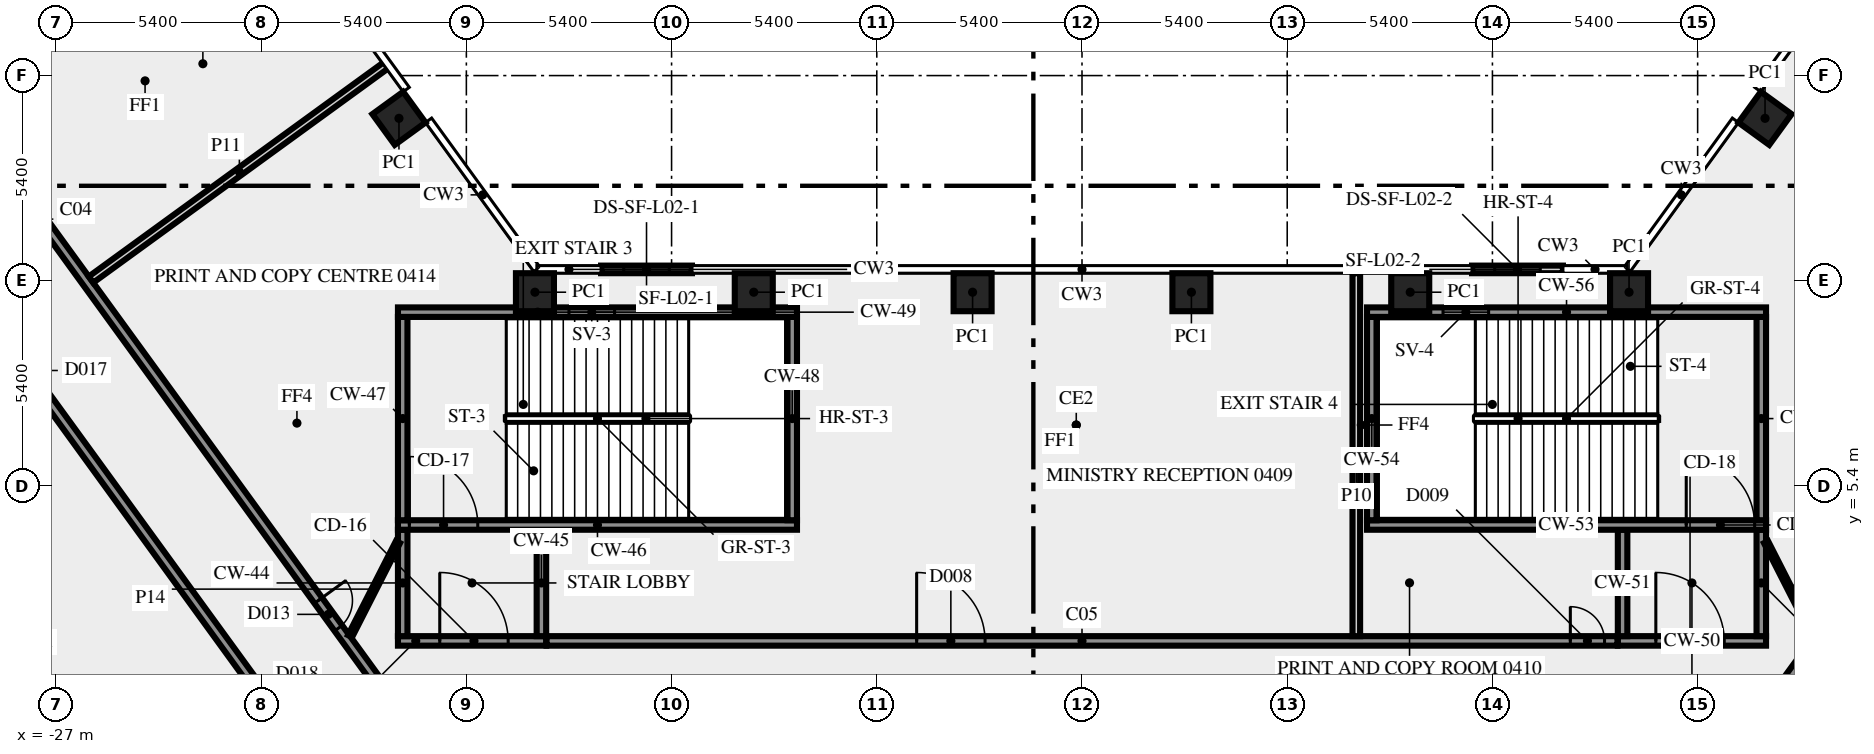
"""IFC4 building model, lengths in metres.
Left out: names, types, materials, properties, quantities, classifications, styles, units other than length and angle.
Written with IfcOpenShell. Run it as: python <this file> out.ifc"""

import sys

from ifc_helpers import new_model, si_unit, direction, frame, frame_2d, origin, origin_2d, place, context, subcontext, project, spatial, rectangle, extrude, element, fill, save


model = new_model("IFC4")
c1 = context("Model", 3, precision=1e-05, world=origin(), true_north=direction((0.0, 1.0)))
c2 = subcontext(c1, "Body", "Model", "MODEL_VIEW")
j1 = project(units=[si_unit("LENGTHUNIT", "METRE"), si_unit("PLANEANGLEUNIT", "RADIAN")], contexts=[c1])
p1 = place(None, origin())
s1 = spatial("IfcSite", under=j1, at=p1, CompositionType="ELEMENT")
p2 = place(p1, origin())
s2 = spatial("IfcBuilding", under=s1, at=p2, CompositionType="ELEMENT")
p3 = place(p2, frame((0.0, 0.0, 20.5)))
s3 = spatial("IfcBuildingStorey", under=s2, at=p3, CompositionType="ELEMENT", Elevation=20.5)
for number, where, z_axis, x_axis in (
    (1, (-17.974, 15.075, 0.0), (0.0, 0.0, 1.0), (-0.588, 0.809, 0.0)),
    (2, (17.974, 15.075, 0.0), (0.0, 0.0, 1.0), (-0.588, -0.809, 0.0)),
    (3, (14.395, 10.5, 0.0), (0.0, 0.0, 1.0), (-1.0, 0.0, 0.0)),
    (4, (8.637, 10.5, 0.0), (0.0, 0.0, 1.0), (-1.0, 0.0, 0.0)),
    (5, (2.879, 10.5, 0.0), (0.0, 0.0, 1.0), (-1.0, 0.0, 0.0)),
    (6, (-2.879, 10.5, 0.0), (0.0, 0.0, 1.0), (-1.0, 0.0, 0.0)),
    (7, (-8.637, 10.5, 0.0), (0.0, 0.0, 1.0), (-1.0, 0.0, 0.0)),
    (8, (-14.395, 10.5, 0.0), (0.0, 0.0, 1.0), (-1.0, 0.0, 0.0)),
):
    element("IfcColumn", number, at=place(p3, frame(where, z_axis=z_axis, x_axis=x_axis)), inside=s3, PredefinedType="COLUMN", context=c2, shape_type="SweptSolid", body=[
        extrude(rectangle(XDim=1.0, YDim=1.0, at=origin_2d()), origin(), (0.0, 0.0, 1.0), 3.9),
    ])
p4 = place(p3, frame((12.655, 11.1, 0.0), z_axis=(0.0, 0.0, 1.0), x_axis=(-1.0, 0.0, 0.0)))
e9 = element("IfcWall", 9, at=p4, inside=s3, PredefinedType="SOLIDWALL", context=c2, shape_type="SweptSolid", body=[
    extrude(rectangle(XDim=2.392, YDim=0.2, at=frame_2d((1.196, 0.0))), origin(), (0.0, 0.0, 1.0), 3.9),
])
p5 = place(p4, frame((0.596, 0.0, 1.0)))
e10 = element("IfcOpeningElement", 10, at=p5, cuts=e9, PredefinedType="OPENING", context=c2, shape_type="SweptSolid", body=[
    extrude(rectangle(XDim=1.2, YDim=1.2, at=frame_2d((0.6, 0.6))), frame((0.0, 0.11, 0.0), z_axis=(0.0, -1.0, 0.0), x_axis=(1.0, 0.0, 0.0)), (0.0, 0.0, 1.0), 0.22),
])
p6 = place(p3, frame((-10.263, 11.1, 0.0), z_axis=(0.0, 0.0, 1.0), x_axis=(-1.0, 0.0, 0.0)))
e11 = element("IfcWall", 11, at=p6, inside=s3, PredefinedType="SOLIDWALL", context=c2, shape_type="SweptSolid", body=[
    extrude(rectangle(XDim=2.392, YDim=0.2, at=frame_2d((1.196, 0.0))), origin(), (0.0, 0.0, 1.0), 3.9),
])
p7 = place(p6, frame((0.596, 0.0, 1.0)))
e12 = element("IfcOpeningElement", 12, at=p7, cuts=e11, PredefinedType="OPENING", context=c2, shape_type="SweptSolid", body=[
    extrude(rectangle(XDim=1.2, YDim=1.2, at=frame_2d((0.6, 0.6))), frame((0.0, 0.11, 0.0), z_axis=(0.0, -1.0, 0.0), x_axis=(1.0, 0.0, 0.0)), (0.0, 0.0, 1.0), 0.22),
])
p8 = place(p3, frame((-18.0, 1.325, 0.0), z_axis=(0.0, 0.0, 1.0), x_axis=(1.0, 0.0, 0.0)))
e13 = element("IfcWall", 13, at=p8, inside=s3, PredefinedType="SHEAR", context=c2, shape_type="SweptSolid", body=[
    extrude(rectangle(XDim=3.9, YDim=0.25, at=frame_2d((1.95, 0.0))), origin(), (0.0, 0.0, 1.0), 3.9),
])
p9 = place(p8, frame((1.1, 0.0, 0.0)))
e14 = element("IfcOpeningElement", 14, at=p9, cuts=e13, PredefinedType="OPENING", context=c2, shape_type="SweptSolid", body=[
    extrude(rectangle(XDim=1.8, YDim=2.1, at=frame_2d((0.9, 1.05))), frame((0.0, 0.135, 0.0), z_axis=(0.0, -1.0, 0.0), x_axis=(1.0, 0.0, 0.0)), (0.0, 0.0, 1.0), 0.27),
])
for number, where, z_axis, x_axis in (
    (15, (-17.875, 1.45, 0.0), (0.0, 0.0, 1.0), (0.0, 1.0, 0.0)),
    (16, (-14.225, 1.45, 0.0), (0.0, 0.0, 1.0), (0.0, 1.0, 0.0)),
):
    element("IfcWall", number, at=place(p3, frame(where, z_axis=z_axis, x_axis=x_axis)), inside=s3, PredefinedType="SHEAR", context=c2, shape_type="SweptSolid", body=[
        extrude(rectangle(XDim=2.8, YDim=0.25, at=frame_2d((1.4, 0.0))), origin(), (0.0, 0.0, 1.0), 3.9),
    ])
p10 = place(p3, frame((-18.0, 4.375, 0.0), z_axis=(0.0, 0.0, 1.0), x_axis=(1.0, 0.0, 0.0)))
e17 = element("IfcWall", 17, at=p10, inside=s3, PredefinedType="SHEAR", context=c2, shape_type="SweptSolid", body=[
    extrude(rectangle(XDim=10.5, YDim=0.25, at=frame_2d((5.25, 0.0))), origin(), (0.0, 0.0, 1.0), 3.9),
])
p11 = place(p10, frame((0.3, 0.0, 0.0)))
e18 = element("IfcOpeningElement", 18, at=p11, cuts=e17, PredefinedType="OPENING", context=c2, shape_type="SweptSolid", body=[
    extrude(rectangle(XDim=1.8, YDim=2.1, at=frame_2d((0.9, 1.05))), frame((0.0, 0.135, 0.0), z_axis=(0.0, -1.0, 0.0), x_axis=(1.0, 0.0, 0.0)), (0.0, 0.0, 1.0), 0.27),
])
for number, where, z_axis, x_axis in (
    (19, (-17.875, 4.5, 0.0), (0.0, 0.0, 1.0), (0.0, 1.0, 0.0)),
    (20, (-7.625, 4.5, 0.0), (0.0, 0.0, 1.0), (0.0, 1.0, 0.0)),
):
    element("IfcWall", number, at=place(p3, frame(where, z_axis=z_axis, x_axis=x_axis)), inside=s3, PredefinedType="SHEAR", context=c2, shape_type="SweptSolid", body=[
        extrude(rectangle(XDim=5.35, YDim=0.25, at=frame_2d((2.675, 0.0))), origin(), (0.0, 0.0, 1.0), 3.9),
    ])
p12 = place(p3, frame((-18.0, 9.975, 0.0), z_axis=(0.0, 0.0, 1.0), x_axis=(1.0, 0.0, 0.0)))
e21 = element("IfcWall", 21, at=p12, inside=s3, PredefinedType="SHEAR", context=c2, shape_type="SweptSolid", body=[
    extrude(rectangle(XDim=10.5, YDim=0.25, at=frame_2d((5.25, 0.0))), origin(), (0.0, 0.0, 1.0), 3.9),
])
p13 = place(p12, frame((4.5, 0.0, 1.0)))
e22 = element("IfcOpeningElement", 22, at=p13, cuts=e21, PredefinedType="OPENING", context=c2, shape_type="SweptSolid", body=[
    extrude(rectangle(XDim=1.2, YDim=1.2, at=frame_2d((0.6, 0.6))), frame((0.0, 0.135, 0.0), z_axis=(0.0, -1.0, 0.0), x_axis=(1.0, 0.0, 0.0)), (0.0, 0.0, 1.0), 0.27),
])
p14 = place(p3, frame((14.1, 1.325, 0.0), z_axis=(0.0, 0.0, 1.0), x_axis=(1.0, 0.0, 0.0)))
e23 = element("IfcWall", 23, at=p14, inside=s3, PredefinedType="SHEAR", context=c2, shape_type="SweptSolid", body=[
    extrude(rectangle(XDim=3.9, YDim=0.25, at=frame_2d((1.95, 0.0))), origin(), (0.0, 0.0, 1.0), 3.9),
])
p15 = place(p14, frame((1.0, 0.0, 0.0)))
e24 = element("IfcOpeningElement", 24, at=p15, cuts=e23, PredefinedType="OPENING", context=c2, shape_type="SweptSolid", body=[
    extrude(rectangle(XDim=1.8, YDim=2.1, at=frame_2d((0.9, 1.05))), frame((0.0, 0.135, 0.0), z_axis=(0.0, -1.0, 0.0), x_axis=(1.0, 0.0, 0.0)), (0.0, 0.0, 1.0), 0.27),
])
for number, where, z_axis, x_axis in (
    (25, (14.225, 1.45, 0.0), (0.0, 0.0, 1.0), (0.0, 1.0, 0.0)),
    (26, (17.875, 1.45, 0.0), (0.0, 0.0, 1.0), (0.0, 1.0, 0.0)),
):
    element("IfcWall", number, at=place(p3, frame(where, z_axis=z_axis, x_axis=x_axis)), inside=s3, PredefinedType="SHEAR", context=c2, shape_type="SweptSolid", body=[
        extrude(rectangle(XDim=2.8, YDim=0.25, at=frame_2d((1.4, 0.0))), origin(), (0.0, 0.0, 1.0), 3.9),
    ])
p16 = place(p3, frame((7.5, 4.375, 0.0), z_axis=(0.0, 0.0, 1.0), x_axis=(1.0, 0.0, 0.0)))
e27 = element("IfcWall", 27, at=p16, inside=s3, PredefinedType="SHEAR", context=c2, shape_type="SweptSolid", body=[
    extrude(rectangle(XDim=10.5, YDim=0.25, at=frame_2d((5.25, 0.0))), origin(), (0.0, 0.0, 1.0), 3.9),
])
p17 = place(p16, frame((8.4, 0.0, 0.0)))
e28 = element("IfcOpeningElement", 28, at=p17, cuts=e27, PredefinedType="OPENING", context=c2, shape_type="SweptSolid", body=[
    extrude(rectangle(XDim=1.8, YDim=2.1, at=frame_2d((0.9, 1.05))), frame((0.0, 0.135, 0.0), z_axis=(0.0, -1.0, 0.0), x_axis=(1.0, 0.0, 0.0)), (0.0, 0.0, 1.0), 0.27),
])
for number, where, z_axis, x_axis in (
    (29, (7.625, 4.5, 0.0), (0.0, 0.0, 1.0), (0.0, 1.0, 0.0)),
    (30, (17.875, 4.5, 0.0), (0.0, 0.0, 1.0), (0.0, 1.0, 0.0)),
):
    element("IfcWall", number, at=place(p3, frame(where, z_axis=z_axis, x_axis=x_axis)), inside=s3, PredefinedType="SHEAR", context=c2, shape_type="SweptSolid", body=[
        extrude(rectangle(XDim=5.35, YDim=0.25, at=frame_2d((2.675, 0.0))), origin(), (0.0, 0.0, 1.0), 3.9),
    ])
p18 = place(p3, frame((7.5, 9.975, 0.0), z_axis=(0.0, 0.0, 1.0), x_axis=(1.0, 0.0, 0.0)))
e31 = element("IfcWall", 31, at=p18, inside=s3, PredefinedType="SHEAR", context=c2, shape_type="SweptSolid", body=[
    extrude(rectangle(XDim=10.5, YDim=0.25, at=frame_2d((5.25, 0.0))), origin(), (0.0, 0.0, 1.0), 3.9),
])
p19 = place(p18, frame((2.0, 0.0, 1.0)))
e32 = element("IfcOpeningElement", 32, at=p19, cuts=e31, PredefinedType="OPENING", context=c2, shape_type="SweptSolid", body=[
    extrude(rectangle(XDim=1.2, YDim=1.2, at=frame_2d((0.6, 0.6))), frame((0.0, 0.135, 0.0), z_axis=(0.0, -1.0, 0.0), x_axis=(1.0, 0.0, 0.0)), (0.0, 0.0, 1.0), 0.27),
])
p20 = place(p3, frame((-20.531, -1.523, 0.0), z_axis=(0.0, 0.0, 1.0), x_axis=(-0.587784522481, 0.809017524614, 0.0)))
e33 = element("IfcWall", 33, at=p20, inside=s3, PredefinedType="SOLIDWALL", context=c2, shape_type="SweptSolid", body=[
    extrude(rectangle(XDim=49.912, YDim=0.25, at=frame_2d((24.956, 0.0))), origin(), (0.0, 0.0, 1.0), 3.9),
])
p21 = place(p20, frame((30.765, 0.0, 0.0)))
e34 = element("IfcOpeningElement", 34, at=p21, cuts=e33, PredefinedType="OPENING", context=c2, shape_type="SweptSolid", body=[
    extrude(rectangle(XDim=0.9, YDim=2.1, at=frame_2d((0.45, 1.05))), frame((0.0, 0.135, 0.0), z_axis=(0.0, -1.0, 0.0), x_axis=(1.0, 0.0, 0.0)), (0.0, 0.0, 1.0), 0.27),
])
p22 = place(p20, frame((0.533, 0.0, 0.0)))
e35 = element("IfcOpeningElement", 35, at=p22, cuts=e33, PredefinedType="OPENING", context=c2, shape_type="SweptSolid", body=[
    extrude(rectangle(XDim=0.9, YDim=2.1, at=frame_2d((0.45, 1.05))), frame((0.0, 0.135, 0.0), z_axis=(0.0, -1.0, 0.0), x_axis=(1.0, 0.0, 0.0)), (0.0, 0.0, 1.0), 0.27),
])
p23 = place(p20, frame((22.416, 0.0, 0.0)))
e36 = element("IfcOpeningElement", 36, at=p23, cuts=e33, PredefinedType="OPENING", context=c2, shape_type="SweptSolid", body=[
    extrude(rectangle(XDim=0.9, YDim=2.1, at=frame_2d((0.45, 1.05))), frame((0.0, 0.135, 0.0), z_axis=(0.0, -1.0, 0.0), x_axis=(1.0, 0.0, 0.0)), (0.0, 0.0, 1.0), 0.27),
])
p24 = place(p20, frame((11.866, 0.0, 0.0)))
e37 = element("IfcOpeningElement", 37, at=p24, cuts=e33, PredefinedType="OPENING", context=c2, shape_type="SweptSolid", body=[
    extrude(rectangle(XDim=0.9, YDim=2.1, at=frame_2d((0.45, 1.05))), frame((0.0, 0.135, 0.0), z_axis=(0.0, -1.0, 0.0), x_axis=(1.0, 0.0, 0.0)), (0.0, 0.0, 1.0), 0.27),
])
p25 = place(p20, frame((29.166, 0.0, 0.0)))
e38 = element("IfcOpeningElement", 38, at=p25, cuts=e33, PredefinedType="OPENING", context=c2, shape_type="SweptSolid", body=[
    extrude(rectangle(XDim=0.9, YDim=2.1, at=frame_2d((0.45, 1.05))), frame((0.0, 0.135, 0.0), z_axis=(0.0, -1.0, 0.0), x_axis=(1.0, 0.0, 0.0)), (0.0, 0.0, 1.0), 0.27),
])
p26 = place(p3, frame((-37.232, 25.972, 0.0), z_axis=(0.0, 0.0, 1.0), x_axis=(0.587786323093, -0.809016216391, 0.0)))
e39 = element("IfcWall", 39, at=p26, inside=s3, PredefinedType="SOLIDWALL", context=c2, shape_type="SweptSolid", body=[
    extrude(rectangle(XDim=33.493, YDim=0.25, at=frame_2d((16.747, 0.0))), origin(), (0.0, 0.0, 1.0), 3.9),
])
p27 = place(p26, frame((10.685, 0.0, 0.0)))
e40 = element("IfcOpeningElement", 40, at=p27, cuts=e39, PredefinedType="OPENING", context=c2, shape_type="SweptSolid", body=[
    extrude(rectangle(XDim=1.0, YDim=2.1, at=frame_2d((0.5, 1.05))), frame((0.0, 0.135, 0.0), z_axis=(0.0, -1.0, 0.0), x_axis=(1.0, 0.0, 0.0)), (0.0, 0.0, 1.0), 0.27),
])
p28 = place(p26, frame((29.152, 0.0, 0.0)))
e41 = element("IfcOpeningElement", 41, at=p28, cuts=e39, PredefinedType="OPENING", context=c2, shape_type="SweptSolid", body=[
    extrude(rectangle(XDim=0.9, YDim=2.1, at=frame_2d((0.45, 1.05))), frame((0.0, 0.135, 0.0), z_axis=(0.0, -1.0, 0.0), x_axis=(1.0, 0.0, 0.0)), (0.0, 0.0, 1.0), 0.27),
])
p29 = place(p26, frame((12.385, 0.0, 0.0)))
e42 = element("IfcOpeningElement", 42, at=p29, cuts=e39, PredefinedType="OPENING", context=c2, shape_type="SweptSolid", body=[
    extrude(rectangle(XDim=0.9, YDim=2.1, at=frame_2d((0.45, 1.05))), frame((0.0, 0.135, 0.0), z_axis=(0.0, -1.0, 0.0), x_axis=(1.0, 0.0, 0.0)), (0.0, 0.0, 1.0), 0.27),
])
p30 = place(p3, frame((-14.09, 1.325, 0.0), z_axis=(0.0, 0.0, 1.0), x_axis=(1.0, 0.0, 0.0)))
e43 = element("IfcWall", 43, at=p30, inside=s3, PredefinedType="SOLIDWALL", context=c2, shape_type="SweptSolid", body=[
    extrude(rectangle(XDim=28.18, YDim=0.25, at=frame_2d((14.09, 0.0))), origin(), (0.0, 0.0, 1.0), 3.9),
])
p31 = place(p30, frame((26.94, 0.0, 0.0)))
e44 = element("IfcOpeningElement", 44, at=p31, cuts=e43, PredefinedType="OPENING", context=c2, shape_type="SweptSolid", body=[
    extrude(rectangle(XDim=0.9, YDim=2.1, at=frame_2d((0.45, 1.05))), frame((0.0, 0.135, 0.0), z_axis=(0.0, -1.0, 0.0), x_axis=(1.0, 0.0, 0.0)), (0.0, 0.0, 1.0), 0.27),
])
p32 = place(p30, frame((9.739, 0.0, 0.0)))
e45 = element("IfcOpeningElement", 45, at=p32, cuts=e43, PredefinedType="OPENING", context=c2, shape_type="SweptSolid", body=[
    extrude(rectangle(XDim=1.8, YDim=2.1, at=frame_2d((0.9, 1.05))), frame((0.0, 0.135, 0.0), z_axis=(0.0, -1.0, 0.0), x_axis=(1.0, 0.0, 0.0)), (0.0, 0.0, 1.0), 0.27),
])
p33 = place(p3, frame((17.545, -1.125, 0.0), z_axis=(0.0, 0.0, 1.0), x_axis=(0.587786323093, 0.809016216391, 0.0)))
e46 = element("IfcWall", 46, at=p33, inside=s3, PredefinedType="SOLIDWALL", context=c2, shape_type="SweptSolid", body=[
    extrude(rectangle(XDim=33.493, YDim=0.25, at=frame_2d((16.747, 0.0))), origin(), (0.0, 0.0, 1.0), 3.9),
])
p34 = place(p33, frame((24.508, 0.0, 0.0)))
e47 = element("IfcOpeningElement", 47, at=p34, cuts=e46, PredefinedType="OPENING", context=c2, shape_type="SweptSolid", body=[
    extrude(rectangle(XDim=0.9, YDim=2.1, at=frame_2d((0.45, 1.05))), frame((0.0, 0.135, 0.0), z_axis=(0.0, -1.0, 0.0), x_axis=(1.0, 0.0, 0.0)), (0.0, 0.0, 1.0), 0.27),
])
p35 = place(p33, frame((12.724, 0.0, 0.0)))
e48 = element("IfcOpeningElement", 48, at=p35, cuts=e46, PredefinedType="OPENING", context=c2, shape_type="SweptSolid", body=[
    extrude(rectangle(XDim=1.8, YDim=2.1, at=frame_2d((0.9, 1.05))), frame((0.0, 0.135, 0.0), z_axis=(0.0, -1.0, 0.0), x_axis=(1.0, 0.0, 0.0)), (0.0, 0.0, 1.0), 0.27),
])
p36 = place(p3, frame((-30.056, 16.308, 0.0), z_axis=(0.0, 0.0, 1.0), x_axis=(0.807610282865, 0.589716568371, 0.0)))
e49 = element("IfcWall", 49, at=p36, inside=s3, PredefinedType="PARTITIONING", context=c2, shape_type="SweptSolid", body=[
    extrude(rectangle(XDim=9.55, YDim=0.12, at=frame_2d((4.775, 0.0))), origin(), (0.0, 0.0, 1.0), 2.9),
])
p37 = place(p3, frame((7.218, 11.0, 0.0), z_axis=(0.0, 0.0, 1.0), x_axis=(0.0, -1.0, 0.0)))
e50 = element("IfcWall", 50, at=p37, inside=s3, PredefinedType="SOLIDWALL", context=c2, shape_type="SweptSolid", body=[
    extrude(rectangle(XDim=9.55, YDim=0.2, at=frame_2d((4.775, 0.0))), origin(), (0.0, 0.0, 1.0), 2.9),
])
p38 = place(p3, frame((-18.269, 16.504, 0.0), z_axis=(0.0, 0.0, 1.0), x_axis=(-0.809047748514, -0.587742920522, 0.0)))
e51 = element("IfcWall", 51, at=p38, inside=s3, PredefinedType="SOLIDWALL", context=c2, shape_type="SweptSolid", body=[
    extrude(rectangle(XDim=9.651, YDim=0.2, at=frame_2d((4.825, 0.0))), origin(), (0.0, 0.0, 1.0), 2.9),
])
for number, where, z_axis, x_axis in (
    (52, (-19.261, 1.45, 0.0), (0.0, 0.0, 1.0), (0.454, 0.891, 0.0)),
    (53, (18.0, 3.925, 0.0), (0.0, 0.0, 1.0), (0.454, -0.891, 0.0)),
):
    element("IfcWall", number, at=place(p3, frame(where, z_axis=z_axis, x_axis=x_axis)), inside=s3, PredefinedType="PARTITIONING", context=c2, shape_type="SweptSolid", body=[
        extrude(rectangle(XDim=2.778, YDim=0.12, at=frame_2d((1.389, 0.0))), origin(), (0.0, 0.0, 1.0), 3.9),
    ])
p39 = place(p5, origin())
e54 = element("IfcWindow", 54, at=p39, inside=s3, PartitioningType="SINGLE_PANEL", PredefinedType="WINDOW", context=c2, shape_type="SweptSolid", body=[
    extrude(rectangle(XDim=1.2, YDim=1.2, at=frame_2d((0.6, 0.6))), frame((0.0, 0.03, 0.0), z_axis=(0.0, -1.0, 0.0), x_axis=(1.0, 0.0, 0.0)), (0.0, 0.0, 1.0), 0.06),
])
fill(e10, e54)
p40 = place(p7, origin())
e55 = element("IfcWindow", 55, at=p40, inside=s3, PartitioningType="SINGLE_PANEL", PredefinedType="WINDOW", context=c2, shape_type="SweptSolid", body=[
    extrude(rectangle(XDim=1.2, YDim=1.2, at=frame_2d((0.6, 0.6))), frame((0.0, 0.03, 0.0), z_axis=(0.0, -1.0, 0.0), x_axis=(1.0, 0.0, 0.0)), (0.0, 0.0, 1.0), 0.06),
])
fill(e12, e55)
p41 = place(p9, origin())
e56 = element("IfcDoor", 56, at=p41, inside=s3, OperationType="DOUBLE_DOOR_SINGLE_SWING", PredefinedType="DOOR", context=c2, shape_type="SweptSolid", body=[
    extrude(rectangle(XDim=1.8, YDim=2.1, at=frame_2d((0.9, 1.05))), frame((0.0, 0.025, 0.0), z_axis=(0.0, -1.0, 0.0), x_axis=(1.0, 0.0, 0.0)), (0.0, 0.0, 1.0), 0.05),
])
fill(e14, e56)
p42 = place(p11, origin())
e57 = element("IfcDoor", 57, at=p42, inside=s3, OperationType="DOUBLE_DOOR_SINGLE_SWING", PredefinedType="DOOR", context=c2, shape_type="SweptSolid", body=[
    extrude(rectangle(XDim=1.8, YDim=2.1, at=frame_2d((0.9, 1.05))), frame((0.0, 0.025, 0.0), z_axis=(0.0, -1.0, 0.0), x_axis=(1.0, 0.0, 0.0)), (0.0, 0.0, 1.0), 0.05),
])
fill(e18, e57)
p43 = place(p13, origin())
e58 = element("IfcWindow", 58, at=p43, inside=s3, PartitioningType="SINGLE_PANEL", PredefinedType="WINDOW", context=c2, shape_type="SweptSolid", body=[
    extrude(rectangle(XDim=1.2, YDim=1.2, at=frame_2d((0.6, 0.6))), frame((0.0, 0.03, 0.0), z_axis=(0.0, -1.0, 0.0), x_axis=(1.0, 0.0, 0.0)), (0.0, 0.0, 1.0), 0.06),
])
fill(e22, e58)
p44 = place(p15, origin())
e59 = element("IfcDoor", 59, at=p44, inside=s3, OperationType="DOUBLE_DOOR_SINGLE_SWING", PredefinedType="DOOR", context=c2, shape_type="SweptSolid", body=[
    extrude(rectangle(XDim=1.8, YDim=2.1, at=frame_2d((0.9, 1.05))), frame((0.0, 0.025, 0.0), z_axis=(0.0, -1.0, 0.0), x_axis=(1.0, 0.0, 0.0)), (0.0, 0.0, 1.0), 0.05),
])
fill(e24, e59)
p45 = place(p17, origin())
e60 = element("IfcDoor", 60, at=p45, inside=s3, OperationType="DOUBLE_DOOR_SINGLE_SWING", PredefinedType="DOOR", context=c2, shape_type="SweptSolid", body=[
    extrude(rectangle(XDim=1.8, YDim=2.1, at=frame_2d((0.9, 1.05))), frame((0.0, 0.025, 0.0), z_axis=(0.0, -1.0, 0.0), x_axis=(1.0, 0.0, 0.0)), (0.0, 0.0, 1.0), 0.05),
])
fill(e28, e60)
p46 = place(p19, origin())
e61 = element("IfcWindow", 61, at=p46, inside=s3, PartitioningType="SINGLE_PANEL", PredefinedType="WINDOW", context=c2, shape_type="SweptSolid", body=[
    extrude(rectangle(XDim=1.2, YDim=1.2, at=frame_2d((0.6, 0.6))), frame((0.0, 0.03, 0.0), z_axis=(0.0, -1.0, 0.0), x_axis=(1.0, 0.0, 0.0)), (0.0, 0.0, 1.0), 0.06),
])
fill(e32, e61)
p47 = place(p31, origin())
e62 = element("IfcDoor", 62, at=p47, inside=s3, OperationType="SINGLE_SWING_RIGHT", PredefinedType="DOOR", context=c2, shape_type="SweptSolid", body=[
    extrude(rectangle(XDim=0.9, YDim=2.1, at=frame_2d((0.45, 1.05))), frame((0.0, 0.025, 0.0), z_axis=(0.0, -1.0, 0.0), x_axis=(1.0, 0.0, 0.0)), (0.0, 0.0, 1.0), 0.05),
])
fill(e44, e62)
p48 = place(p28, origin())
e63 = element("IfcDoor", 63, at=p48, inside=s3, OperationType="SINGLE_SWING_RIGHT", PredefinedType="DOOR", context=c2, shape_type="SweptSolid", body=[
    extrude(rectangle(XDim=0.9, YDim=2.1, at=frame_2d((0.45, 1.05))), frame((0.0, 0.025, 0.0), z_axis=(0.0, -1.0, 0.0), x_axis=(1.0, 0.0, 0.0)), (0.0, 0.0, 1.0), 0.05),
])
fill(e41, e63)
p49 = place(p32, origin())
e64 = element("IfcDoor", 64, at=p49, inside=s3, OperationType="DOUBLE_DOOR_SINGLE_SWING", PredefinedType="DOOR", context=c2, shape_type="SweptSolid", body=[
    extrude(rectangle(XDim=1.8, YDim=2.1, at=frame_2d((0.9, 1.05))), frame((0.0, 0.025, 0.0), z_axis=(0.0, -1.0, 0.0), x_axis=(1.0, 0.0, 0.0)), (0.0, 0.0, 1.0), 0.05),
])
fill(e45, e64)
save(model, sys.argv[1])
